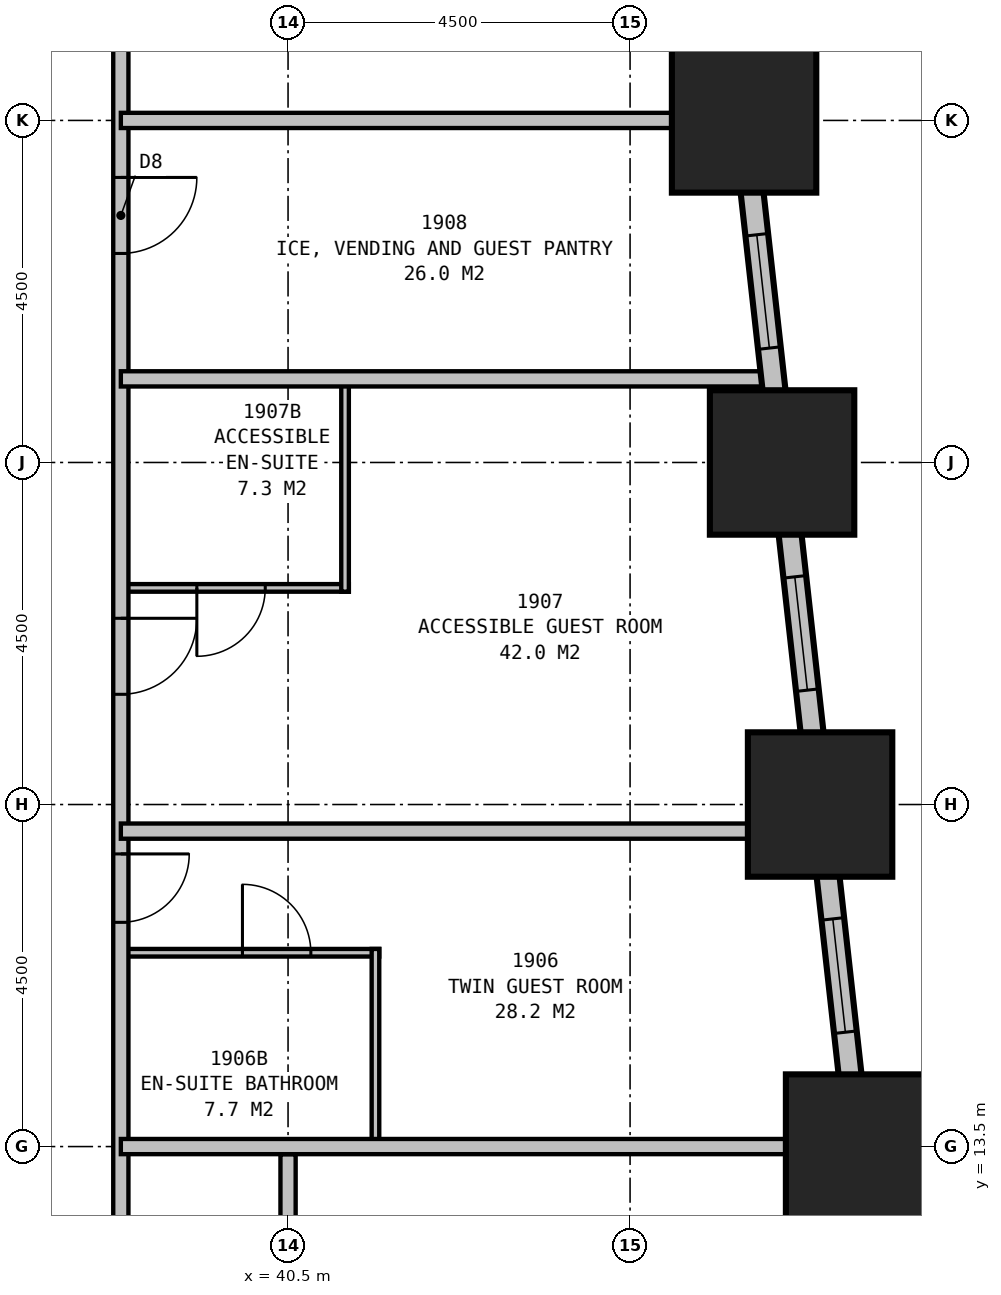
"""IFC4 building model, lengths in metres.
Left out: names, types, materials, properties, quantities, classifications, styles, units other than length and angle.
Written with IfcOpenShell. Run it as: python <this file> out.ifc"""

import sys

from ifc_helpers import new_model, si_unit, direction, frame, frame_2d, origin, origin_2d, place, context, subcontext, project, spatial, rectangle, extrude, element, fill, save


model = new_model("IFC4")
c1 = context("Model", 3, precision=1e-05, world=origin(), true_north=direction((0.0, 1.0)))
c2 = subcontext(c1, "Body", "Model", "MODEL_VIEW")
j1 = project(units=[si_unit("LENGTHUNIT", "METRE"), si_unit("PLANEANGLEUNIT", "RADIAN")], contexts=[c1])
p1 = place(None, origin())
s1 = spatial("IfcSite", under=j1, at=p1, CompositionType="ELEMENT")
p2 = place(p1, origin())
s2 = spatial("IfcBuilding", under=s1, at=p2, CompositionType="ELEMENT")
p3 = place(p2, frame((0.0, 0.0, 78.7)))
s3 = spatial("IfcBuildingStorey", under=s2, at=p3, CompositionType="ELEMENT", Elevation=78.7)
for number, where, z_axis, x_axis in (
    (1, (48.0, 13.5, 0.0), (0.0, 0.0, 1.0), (1.0, 0.0, 0.0)),
    (2, (47.5, 18.0, 0.0), (0.0, 0.0, 1.0), (1.0, 0.0, 0.0)),
    (3, (47.0, 22.5, 0.0), (0.0, 0.0, 1.0), (1.0, 0.0, 0.0)),
    (4, (46.5, 27.0, 0.0), (0.0, 0.0, 1.0), (1.0, 0.0, 0.0)),
):
    element("IfcColumn", number, at=place(p3, frame(where, z_axis=z_axis, x_axis=x_axis)), inside=s3, PredefinedType="COLUMN", context=c2, shape_type="SweptSolid", body=[
        extrude(rectangle(XDim=1.9, YDim=1.9, at=origin_2d()), origin(), (0.0, 0.0, 1.0), 3.5),
    ])
p4 = place(p3, frame((49.017, 4.351, 0.0), z_axis=(0.0, 0.0, 1.0), x_axis=(-0.110433201132, 0.993883548555, 0.0)))
e5 = element("IfcWall", 5, at=p4, inside=s3, PredefinedType="STANDARD", context=c2, shape_type="SweptSolid", body=[
    extrude(rectangle(XDim=31.994, YDim=0.3, at=frame_2d((15.997, 0.0))), origin(), (0.0, 0.0, 1.0), 2.05),
])
p5 = place(p4, frame((1.664, 0.0, 0.5)))
e6 = element("IfcOpeningElement", 6, at=p5, cuts=e5, PredefinedType="OPENING", context=c2, shape_type="SweptSolid", body=[
    extrude(rectangle(XDim=1.5, YDim=1.4, at=frame_2d((0.75, 0.7))), frame((0.0, 0.16, 0.0), z_axis=(0.0, -1.0, 0.0), x_axis=(1.0, 0.0, 0.0)), (0.0, 0.0, 1.0), 0.32),
])
p6 = place(p4, frame((6.192, 0.0, 0.5)))
e7 = element("IfcOpeningElement", 7, at=p6, cuts=e5, PredefinedType="OPENING", context=c2, shape_type="SweptSolid", body=[
    extrude(rectangle(XDim=1.5, YDim=1.4, at=frame_2d((0.75, 0.7))), frame((0.0, 0.16, 0.0), z_axis=(0.0, -1.0, 0.0), x_axis=(1.0, 0.0, 0.0)), (0.0, 0.0, 1.0), 0.32),
])
p7 = place(p4, frame((10.719, 0.0, 0.5)))
e8 = element("IfcOpeningElement", 8, at=p7, cuts=e5, PredefinedType="OPENING", context=c2, shape_type="SweptSolid", body=[
    extrude(rectangle(XDim=1.5, YDim=1.4, at=frame_2d((0.75, 0.7))), frame((0.0, 0.16, 0.0), z_axis=(0.0, -1.0, 0.0), x_axis=(1.0, 0.0, 0.0)), (0.0, 0.0, 1.0), 0.32),
])
p8 = place(p4, frame((15.247, 0.0, 0.5)))
e9 = element("IfcOpeningElement", 9, at=p8, cuts=e5, PredefinedType="OPENING", context=c2, shape_type="SweptSolid", body=[
    extrude(rectangle(XDim=1.5, YDim=1.4, at=frame_2d((0.75, 0.7))), frame((0.0, 0.16, 0.0), z_axis=(0.0, -1.0, 0.0), x_axis=(1.0, 0.0, 0.0)), (0.0, 0.0, 1.0), 0.32),
])
p9 = place(p4, frame((19.775, 0.0, 0.5)))
e10 = element("IfcOpeningElement", 10, at=p9, cuts=e5, PredefinedType="OPENING", context=c2, shape_type="SweptSolid", body=[
    extrude(rectangle(XDim=1.5, YDim=1.4, at=frame_2d((0.75, 0.7))), frame((0.0, 0.16, 0.0), z_axis=(0.0, -1.0, 0.0), x_axis=(1.0, 0.0, 0.0)), (0.0, 0.0, 1.0), 0.32),
])
p10 = place(p4, frame((24.302, 0.0, 0.5)))
e11 = element("IfcOpeningElement", 11, at=p10, cuts=e5, PredefinedType="OPENING", context=c2, shape_type="SweptSolid", body=[
    extrude(rectangle(XDim=1.5, YDim=1.4, at=frame_2d((0.75, 0.7))), frame((0.0, 0.16, 0.0), z_axis=(0.0, -1.0, 0.0), x_axis=(1.0, 0.0, 0.0)), (0.0, 0.0, 1.0), 0.32),
])
p11 = place(p4, frame((28.83, 0.0, 0.5)))
e12 = element("IfcOpeningElement", 12, at=p11, cuts=e5, PredefinedType="OPENING", context=c2, shape_type="SweptSolid", body=[
    extrude(rectangle(XDim=1.5, YDim=1.4, at=frame_2d((0.75, 0.7))), frame((0.0, 0.16, 0.0), z_axis=(0.0, -1.0, 0.0), x_axis=(1.0, 0.0, 0.0)), (0.0, 0.0, 1.0), 0.32),
])
p12 = place(p3, frame((38.3, 10.6, 0.0), z_axis=(0.0, 0.0, 1.0), x_axis=(0.0, 1.0, 0.0)))
e13 = element("IfcWall", 13, at=p12, inside=s3, PredefinedType="PARTITIONING", context=c2, shape_type="SweptSolid", body=[
    extrude(rectangle(XDim=18.7, YDim=0.2, at=frame_2d((9.35, 0.0))), origin(), (0.0, 0.0, 1.0), 3.25),
])
p13 = place(p12, frame((6.75, 0.0, 0.0), z_axis=(0.0, 0.0, 1.0), x_axis=(-1.0, 0.0, 0.0)))
e14 = element("IfcOpeningElement", 14, at=p13, cuts=e13, PredefinedType="OPENING", context=c2, shape_type="SweptSolid", body=[
    extrude(rectangle(XDim=0.9, YDim=2.1, at=frame_2d((0.45, 1.05))), frame((0.0, 0.11, 0.0), z_axis=(0.0, -1.0, 0.0), x_axis=(1.0, 0.0, 0.0)), (0.0, 0.0, 1.0), 0.22),
])
p14 = place(p12, frame((9.85, 0.0, 0.0), z_axis=(0.0, 0.0, 1.0), x_axis=(-1.0, 0.0, 0.0)))
e15 = element("IfcOpeningElement", 15, at=p14, cuts=e13, PredefinedType="OPENING", context=c2, shape_type="SweptSolid", body=[
    extrude(rectangle(XDim=1.0, YDim=2.1, at=frame_2d((0.5, 1.05))), frame((0.0, 0.11, 0.0), z_axis=(0.0, -1.0, 0.0), x_axis=(1.0, 0.0, 0.0)), (0.0, 0.0, 1.0), 0.22),
])
p15 = place(p12, frame((15.65, 0.0, 0.0), z_axis=(0.0, 0.0, 1.0), x_axis=(-1.0, 0.0, 0.0)))
e16 = element("IfcOpeningElement", 16, at=p15, cuts=e13, PredefinedType="OPENING", context=c2, shape_type="SweptSolid", body=[
    extrude(rectangle(XDim=1.0, YDim=2.1, at=frame_2d((0.5, 1.05))), frame((0.0, 0.11, 0.0), z_axis=(0.0, -1.0, 0.0), x_axis=(1.0, 0.0, 0.0)), (0.0, 0.0, 1.0), 0.22),
])
p16 = place(p3, frame((38.3, 17.65, 0.0), z_axis=(0.0, 0.0, 1.0), x_axis=(1.0, 0.0, 0.0)))
e17 = element("IfcWall", 17, at=p16, inside=s3, PredefinedType="PARTITIONING", context=c2, shape_type="SweptSolid", body=[
    extrude(rectangle(XDim=9.238, YDim=0.2, at=frame_2d((4.619, 0.0))), origin(), (0.0, 0.0, 1.0), 2.25),
])
p17 = place(p3, frame((38.3, 23.6, 0.0), z_axis=(0.0, 0.0, 1.0), x_axis=(1.0, 0.0, 0.0)))
e18 = element("IfcWall", 18, at=p17, inside=s3, PredefinedType="PARTITIONING", context=c2, shape_type="SweptSolid", body=[
    extrude(rectangle(XDim=8.577, YDim=0.2, at=frame_2d((4.289, 0.0))), origin(), (0.0, 0.0, 1.0), 3.25),
])
p18 = place(p3, frame((41.65, 13.5, 0.0), z_axis=(0.0, 0.0, 1.0), x_axis=(0.0, 1.0, 0.0)))
e19 = element("IfcWall", 19, at=p18, inside=s3, PredefinedType="PLUMBINGWALL", context=c2, shape_type="SweptSolid", body=[
    extrude(rectangle(XDim=2.6, YDim=0.1, at=frame_2d((1.3, 0.0))), origin(), (0.0, 0.0, 1.0), 3.25),
])
p19 = place(p3, frame((38.3, 16.05, 0.0), z_axis=(0.0, 0.0, 1.0), x_axis=(1.0, 0.0, 0.0)))
e20 = element("IfcWall", 20, at=p19, inside=s3, PredefinedType="PLUMBINGWALL", context=c2, shape_type="SweptSolid", body=[
    extrude(rectangle(XDim=3.4, YDim=0.1, at=frame_2d((1.7, 0.0))), origin(), (0.0, 0.0, 1.0), 3.25),
])
p20 = place(p19, frame((1.6, 0.0, 0.0)))
e21 = element("IfcOpeningElement", 21, at=p20, cuts=e20, PredefinedType="OPENING", context=c2, shape_type="SweptSolid", body=[
    extrude(rectangle(XDim=0.9, YDim=2.1, at=frame_2d((0.45, 1.05))), frame((0.0, 0.06, 0.0), z_axis=(0.0, -1.0, 0.0), x_axis=(1.0, 0.0, 0.0)), (0.0, 0.0, 1.0), 0.12),
])
p21 = place(p3, frame((41.25, 20.8, 0.0), z_axis=(0.0, 0.0, 1.0), x_axis=(0.0, 1.0, 0.0)))
e22 = element("IfcWall", 22, at=p21, inside=s3, PredefinedType="PLUMBINGWALL", context=c2, shape_type="SweptSolid", body=[
    extrude(rectangle(XDim=2.8, YDim=0.1, at=frame_2d((1.4, 0.0))), origin(), (0.0, 0.0, 1.0), 3.25),
])
p22 = place(p3, frame((38.3, 20.85, 0.0), z_axis=(0.0, 0.0, 1.0), x_axis=(1.0, 0.0, 0.0)))
e23 = element("IfcWall", 23, at=p22, inside=s3, PredefinedType="PLUMBINGWALL", context=c2, shape_type="SweptSolid", body=[
    extrude(rectangle(XDim=3.0, YDim=0.1, at=frame_2d((1.5, 0.0))), origin(), (0.0, 0.0, 1.0), 3.25),
])
p23 = place(p22, frame((1.9, 0.0, 0.0), z_axis=(0.0, 0.0, 1.0), x_axis=(-1.0, 0.0, 0.0)))
e24 = element("IfcOpeningElement", 24, at=p23, cuts=e23, PredefinedType="OPENING", context=c2, shape_type="SweptSolid", body=[
    extrude(rectangle(XDim=0.9, YDim=2.1, at=frame_2d((0.45, 1.05))), frame((0.0, 0.06, 0.0), z_axis=(0.0, -1.0, 0.0), x_axis=(1.0, 0.0, 0.0)), (0.0, 0.0, 1.0), 0.12),
])
p24 = place(p3, frame((38.3, 13.5, 0.0), z_axis=(0.0, 0.0, 1.0), x_axis=(1.0, 0.0, 0.0)))
e25 = element("IfcWall", 25, at=p24, inside=s3, PredefinedType="PARTITIONING", context=c2, shape_type="SweptSolid", body=[
    extrude(rectangle(XDim=9.921, YDim=0.2, at=frame_2d((4.96, 0.0))), origin(), (0.0, 0.0, 1.0), 1.95),
])
p25 = place(p3, frame((40.5, 4.6, 0.0), z_axis=(0.0, 0.0, 1.0), x_axis=(0.0, 1.0, 0.0)))
e26 = element("IfcWall", 26, at=p25, inside=s3, PredefinedType="PARTITIONING", context=c2, shape_type="SweptSolid", body=[
    extrude(rectangle(XDim=8.8, YDim=0.2, at=frame_2d((4.4, 0.0))), origin(), (0.0, 0.0, 1.0), 2.25),
])
p26 = place(p25, frame((4.05, 0.0, 0.0)))
e27 = element("IfcOpeningElement", 27, at=p26, cuts=e26, PredefinedType="OPENING", context=c2, shape_type="SweptSolid", body=[
    extrude(rectangle(XDim=0.9, YDim=2.1, at=frame_2d((0.45, 1.05))), frame((0.0, 0.11, 0.0), z_axis=(0.0, -1.0, 0.0), x_axis=(1.0, 0.0, 0.0)), (0.0, 0.0, 1.0), 0.22),
])
p27 = place(p3, frame((38.3, 27.0, 0.0), z_axis=(0.0, 0.0, 1.0), x_axis=(1.0, 0.0, 0.0)))
e28 = element("IfcWall", 28, at=p27, inside=s3, PredefinedType="PARTITIONING", context=c2, shape_type="SweptSolid", body=[
    extrude(rectangle(XDim=7.977, YDim=0.2, at=frame_2d((3.988, 0.0))), origin(), (0.0, 0.0, 1.0), 1.95),
])
p28 = place(p7, origin())
e29 = element("IfcWindow", 29, at=p28, inside=s3, PartitioningType="SINGLE_PANEL", PredefinedType="WINDOW", context=c2, shape_type="SweptSolid", body=[
    extrude(rectangle(XDim=1.5, YDim=1.4, at=frame_2d((0.75, 0.7))), frame((0.0, 0.03, 0.0), z_axis=(0.0, -1.0, 0.0), x_axis=(1.0, 0.0, 0.0)), (0.0, 0.0, 1.0), 0.06),
])
fill(e8, e29)
p29 = place(p8, origin())
e30 = element("IfcWindow", 30, at=p29, inside=s3, PartitioningType="SINGLE_PANEL", PredefinedType="WINDOW", context=c2, shape_type="SweptSolid", body=[
    extrude(rectangle(XDim=1.5, YDim=1.4, at=frame_2d((0.75, 0.7))), frame((0.0, 0.03, 0.0), z_axis=(0.0, -1.0, 0.0), x_axis=(1.0, 0.0, 0.0)), (0.0, 0.0, 1.0), 0.06),
])
fill(e9, e30)
p30 = place(p9, origin())
e31 = element("IfcWindow", 31, at=p30, inside=s3, PartitioningType="SINGLE_PANEL", PredefinedType="WINDOW", context=c2, shape_type="SweptSolid", body=[
    extrude(rectangle(XDim=1.5, YDim=1.4, at=frame_2d((0.75, 0.7))), frame((0.0, 0.03, 0.0), z_axis=(0.0, -1.0, 0.0), x_axis=(1.0, 0.0, 0.0)), (0.0, 0.0, 1.0), 0.06),
])
fill(e10, e31)
p31 = place(p13, origin())
e32 = element("IfcDoor", 32, at=p31, inside=s3, OperationType="SINGLE_SWING_LEFT", PredefinedType="DOOR", context=c2, shape_type="SweptSolid", body=[
    extrude(rectangle(XDim=0.9, YDim=2.1, at=frame_2d((0.45, 1.05))), frame((0.0, 0.025, 0.0), z_axis=(0.0, -1.0, 0.0), x_axis=(1.0, 0.0, 0.0)), (0.0, 0.0, 1.0), 0.05),
])
fill(e14, e32)
p32 = place(p14, origin())
e33 = element("IfcDoor", 33, at=p32, inside=s3, OperationType="SINGLE_SWING_LEFT", PredefinedType="DOOR", context=c2, shape_type="SweptSolid", body=[
    extrude(rectangle(XDim=1.0, YDim=2.1, at=frame_2d((0.5, 1.05))), frame((0.0, 0.025, 0.0), z_axis=(0.0, -1.0, 0.0), x_axis=(1.0, 0.0, 0.0)), (0.0, 0.0, 1.0), 0.05),
])
fill(e15, e33)
p33 = place(p15, origin())
e34 = element("IfcDoor", 34, at=p33, inside=s3, OperationType="SINGLE_SWING_LEFT", PredefinedType="DOOR", context=c2, shape_type="SweptSolid", body=[
    extrude(rectangle(XDim=1.0, YDim=2.1, at=frame_2d((0.5, 1.05))), frame((0.0, 0.025, 0.0), z_axis=(0.0, -1.0, 0.0), x_axis=(1.0, 0.0, 0.0)), (0.0, 0.0, 1.0), 0.05),
])
fill(e16, e34)
p34 = place(p20, origin())
e35 = element("IfcDoor", 35, at=p34, inside=s3, OperationType="SINGLE_SWING_LEFT", PredefinedType="DOOR", context=c2, shape_type="SweptSolid", body=[
    extrude(rectangle(XDim=0.9, YDim=2.1, at=frame_2d((0.45, 1.05))), frame((0.0, 0.025, 0.0), z_axis=(0.0, -1.0, 0.0), x_axis=(1.0, 0.0, 0.0)), (0.0, 0.0, 1.0), 0.05),
])
fill(e21, e35)
p35 = place(p23, origin())
e36 = element("IfcDoor", 36, at=p35, inside=s3, OperationType="SINGLE_SWING_RIGHT", PredefinedType="DOOR", context=c2, shape_type="SweptSolid", body=[
    extrude(rectangle(XDim=0.9, YDim=2.1, at=frame_2d((0.45, 1.05))), frame((0.0, 0.025, 0.0), z_axis=(0.0, -1.0, 0.0), x_axis=(1.0, 0.0, 0.0)), (0.0, 0.0, 1.0), 0.05),
])
fill(e24, e36)
save(model, sys.argv[1])
